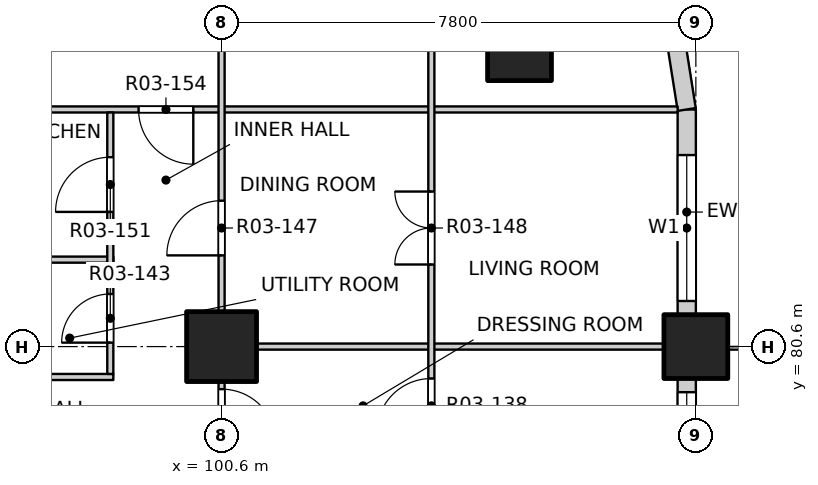
"""IFC4 building model, lengths in metres.
Left out: names, types, materials, properties, quantities, classifications, styles, units other than length and angle.
Written with IfcOpenShell. Run it as: python <this file> out.ifc"""

import sys

from ifc_helpers import new_model, si_unit, direction, frame, frame_2d, origin, origin_2d, place, context, subcontext, project, spatial, rectangle, extrude, element, fill, save


model = new_model("IFC4")
c1 = context("Model", 3, precision=1e-05, world=origin(), true_north=direction((0.0, 1.0)))
c2 = subcontext(c1, "Body", "Model", "MODEL_VIEW")
j1 = project(units=[si_unit("LENGTHUNIT", "METRE"), si_unit("PLANEANGLEUNIT", "RADIAN")], contexts=[c1])
p1 = place(None, origin())
s1 = spatial("IfcSite", under=j1, at=p1, CompositionType="ELEMENT")
p2 = place(p1, origin())
s2 = spatial("IfcBuilding", under=s1, at=p2, CompositionType="ELEMENT")
p3 = place(p2, frame((0.0, 0.0, 43.3)))
s3 = spatial("IfcBuildingStorey", under=s2, at=p3, CompositionType="ELEMENT", Elevation=43.3)
for number, where, z_axis, x_axis in (
    (1, (105.5, 85.5, -0.25), (0.0, 0.0, 1.0), (1.0, 0.0, 0.0)),
    (2, (108.4, 80.6, -0.25), (0.0, 0.0, 1.0), (1.0, 0.0, 0.0)),
):
    element("IfcColumn", number, at=place(p3, frame(where, z_axis=z_axis, x_axis=x_axis)), inside=s3, PredefinedType="COLUMN", context=c2, shape_type="SweptSolid", body=[
        extrude(rectangle(XDim=1.05, YDim=1.05, at=origin_2d()), origin(), (0.0, 0.0, 1.0), 3.35),
    ])
p4 = place(p3, frame((100.6, 80.6, -0.25), z_axis=(0.0, 0.0, 1.0), x_axis=(1.0, 0.0, 0.0)))
e3 = element("IfcColumn", 3, at=p4, inside=s3, PredefinedType="COLUMN", context=c2, shape_type="SweptSolid", body=[
    extrude(rectangle(XDim=1.15, YDim=1.15, at=origin_2d()), origin(), (0.0, 0.0, 1.0), 3.35),
])
p5 = place(p3, frame((108.25, 73.325, 0.0), z_axis=(0.0, 0.0, 1.0), x_axis=(0.0, 1.0, 0.0)))
e4 = element("IfcWall", 4, at=p5, inside=s3, PredefinedType="SOLIDWALL", context=c2, shape_type="SweptSolid", body=[
    extrude(rectangle(XDim=6.75, YDim=0.3, at=frame_2d((3.375, 0.0))), origin(), (0.0, 0.0, 1.0), 3.1),
])
p6 = place(p5, frame((0.525, 0.0, 0.0)))
e5 = element("IfcOpeningElement", 5, at=p6, cuts=e4, PredefinedType="OPENING", context=c2, shape_type="SweptSolid", body=[
    extrude(rectangle(XDim=1.8, YDim=2.4, at=frame_2d((0.9, 1.2))), frame((0.0, 0.16, 0.0), z_axis=(0.0, -1.0, 0.0), x_axis=(1.0, 0.0, 0.0)), (0.0, 0.0, 1.0), 0.32),
])
p7 = place(p5, frame((4.125, 0.0, 0.9)))
e6 = element("IfcOpeningElement", 6, at=p7, cuts=e4, PredefinedType="OPENING", context=c2, shape_type="SweptSolid", body=[
    extrude(rectangle(XDim=2.4, YDim=1.8, at=frame_2d((1.2, 0.9))), frame((0.0, 0.16, 0.0), z_axis=(0.0, -1.0, 0.0), x_axis=(1.0, 0.0, 0.0)), (0.0, 0.0, 1.0), 0.32),
])
p8 = place(p3, frame((108.25, 81.125, 0.0), z_axis=(0.0, 0.0, 1.0), x_axis=(0.0, 1.0, 0.0)))
e7 = element("IfcWall", 7, at=p8, inside=s3, PredefinedType="SOLIDWALL", context=c2, shape_type="SweptSolid", body=[
    extrude(rectangle(XDim=3.375, YDim=0.3, at=frame_2d((1.688, 0.0))), origin(), (0.0, 0.0, 1.0), 3.1),
])
p9 = place(p8, frame((0.225, 0.0, 0.9)))
e8 = element("IfcOpeningElement", 8, at=p9, cuts=e7, PredefinedType="OPENING", context=c2, shape_type="SweptSolid", body=[
    extrude(rectangle(XDim=2.4, YDim=1.8, at=frame_2d((1.2, 0.9))), frame((0.0, 0.16, 0.0), z_axis=(0.0, -1.0, 0.0), x_axis=(1.0, 0.0, 0.0)), (0.0, 0.0, 1.0), 0.32),
])
p10 = place(p3, frame((108.25, 84.5, 0.0), z_axis=(0.0, 0.0, 1.0), x_axis=(-0.156496880861, 0.987678452879, 0.0)))
e9 = element("IfcWall", 9, at=p10, inside=s3, PredefinedType="SOLIDWALL", context=c2, shape_type="SweptSolid", body=[
    extrude(rectangle(XDim=1.173, YDim=0.3, at=frame_2d((0.586, 0.0))), origin(), (0.0, 0.0, 1.0), 3.1),
])
p11 = place(p3, frame((96.6, 80.1, 0.0), z_axis=(0.0, 0.0, 1.0), x_axis=(1.0, 0.0, 0.0)))
e10 = element("IfcWall", 10, at=p11, inside=s3, PredefinedType="PARTITIONING", context=c2, shape_type="SweptSolid", body=[
    extrude(rectangle(XDim=2.22, YDim=0.1, at=frame_2d((1.11, 0.0))), origin(), (0.0, 0.0, 1.0), 3.1),
])
p12 = place(p3, frame((100.55, 80.6, 0.0), z_axis=(0.0, 0.0, 1.0), x_axis=(1.0, 0.0, 0.0)))
e11 = element("IfcWall", 11, at=p12, inside=s3, PredefinedType="PARTITIONING", context=c2, shape_type="SweptSolid", body=[
    extrude(rectangle(XDim=7.55, YDim=0.1, at=frame_2d((3.775, 0.0))), origin(), (0.0, 0.0, 1.0), 3.1),
])
p13 = place(p3, frame((96.6, 82.03, 0.0), z_axis=(0.0, 0.0, 1.0), x_axis=(1.0, 0.0, 0.0)))
e12 = element("IfcWall", 12, at=p13, inside=s3, PredefinedType="PARTITIONING", context=c2, shape_type="SweptSolid", body=[
    extrude(rectangle(XDim=2.22, YDim=0.1, at=frame_2d((1.11, 0.0))), origin(), (0.0, 0.0, 1.0), 3.1),
])
p14 = place(p3, frame((96.6, 84.5, 0.0), z_axis=(0.0, 0.0, 1.0), x_axis=(1.0, 0.0, 0.0)))
e13 = element("IfcWall", 13, at=p14, inside=s3, PredefinedType="PARTITIONING", context=c2, shape_type="SweptSolid", body=[
    extrude(rectangle(XDim=11.5, YDim=0.1, at=frame_2d((5.75, 0.0))), origin(), (0.0, 0.0, 1.0), 3.1),
])
p15 = place(p14, frame((2.635, 0.0, 0.0)))
e14 = element("IfcOpeningElement", 14, at=p15, cuts=e13, PredefinedType="OPENING", context=c2, shape_type="SweptSolid", body=[
    extrude(rectangle(XDim=0.9, YDim=2.1, at=frame_2d((0.45, 1.05))), frame((0.0, 0.06, 0.0), z_axis=(0.0, -1.0, 0.0), x_axis=(1.0, 0.0, 0.0)), (0.0, 0.0, 1.0), 0.12),
])
p16 = place(p3, frame((98.77, 80.15, 0.0), z_axis=(0.0, 0.0, 1.0), x_axis=(0.0, 1.0, 0.0)))
e15 = element("IfcWall", 15, at=p16, inside=s3, PredefinedType="PARTITIONING", context=c2, shape_type="SweptSolid", body=[
    extrude(rectangle(XDim=4.3, YDim=0.1, at=frame_2d((2.15, 0.0))), origin(), (0.0, 0.0, 1.0), 3.1),
])
p17 = place(p16, frame((0.515, 0.0, 0.0)))
e16 = element("IfcOpeningElement", 16, at=p17, cuts=e15, PredefinedType="OPENING", context=c2, shape_type="SweptSolid", body=[
    extrude(rectangle(XDim=0.8, YDim=2.1, at=frame_2d((0.4, 1.05))), frame((0.0, 0.06, 0.0), z_axis=(0.0, -1.0, 0.0), x_axis=(1.0, 0.0, 0.0)), (0.0, 0.0, 1.0), 0.12),
])
p18 = place(p16, frame((2.665, 0.0, 0.0)))
e17 = element("IfcOpeningElement", 17, at=p18, cuts=e15, PredefinedType="OPENING", context=c2, shape_type="SweptSolid", body=[
    extrude(rectangle(XDim=0.9, YDim=2.1, at=frame_2d((0.45, 1.05))), frame((0.0, 0.06, 0.0), z_axis=(0.0, -1.0, 0.0), x_axis=(1.0, 0.0, 0.0)), (0.0, 0.0, 1.0), 0.12),
])
p19 = place(p3, frame((100.6, 41.9, 0.0), z_axis=(0.0, 0.0, 1.0), x_axis=(0.0, 1.0, 0.0)))
e18 = element("IfcWall", 18, at=p19, inside=s3, PredefinedType="PARTITIONING", context=c2, shape_type="SweptSolid", body=[
    extrude(rectangle(XDim=46.2, YDim=0.1, at=frame_2d((23.1, 0.0))), origin(), (0.0, 0.0, 1.0), 3.1),
])
p20 = place(p19, frame((1.2, 0.0, 0.0)))
e19 = element("IfcOpeningElement", 19, at=p20, cuts=e18, PredefinedType="OPENING", context=c2, shape_type="SweptSolid", body=[
    extrude(rectangle(XDim=0.9, YDim=2.1, at=frame_2d((0.45, 1.05))), frame((0.0, 0.06, 0.0), z_axis=(0.0, -1.0, 0.0), x_axis=(1.0, 0.0, 0.0)), (0.0, 0.0, 1.0), 0.12),
])
p21 = place(p19, frame((5.9, 0.0, 0.0)))
e20 = element("IfcOpeningElement", 20, at=p21, cuts=e18, PredefinedType="OPENING", context=c2, shape_type="SweptSolid", body=[
    extrude(rectangle(XDim=0.9, YDim=2.1, at=frame_2d((0.45, 1.05))), frame((0.0, 0.06, 0.0), z_axis=(0.0, -1.0, 0.0), x_axis=(1.0, 0.0, 0.0)), (0.0, 0.0, 1.0), 0.12),
])
p22 = place(p19, frame((9.0, 0.0, 0.0)))
e21 = element("IfcOpeningElement", 21, at=p22, cuts=e18, PredefinedType="OPENING", context=c2, shape_type="SweptSolid", body=[
    extrude(rectangle(XDim=0.9, YDim=2.1, at=frame_2d((0.45, 1.05))), frame((0.0, 0.06, 0.0), z_axis=(0.0, -1.0, 0.0), x_axis=(1.0, 0.0, 0.0)), (0.0, 0.0, 1.0), 0.12),
])
p23 = place(p19, frame((13.725, 0.0, 0.0)))
e22 = element("IfcOpeningElement", 22, at=p23, cuts=e18, PredefinedType="OPENING", context=c2, shape_type="SweptSolid", body=[
    extrude(rectangle(XDim=0.9, YDim=2.1, at=frame_2d((0.45, 1.05))), frame((0.0, 0.06, 0.0), z_axis=(0.0, -1.0, 0.0), x_axis=(1.0, 0.0, 0.0)), (0.0, 0.0, 1.0), 0.12),
])
p24 = place(p19, frame((17.775, 0.0, 0.0)))
e23 = element("IfcOpeningElement", 23, at=p24, cuts=e18, PredefinedType="OPENING", context=c2, shape_type="SweptSolid", body=[
    extrude(rectangle(XDim=0.9, YDim=2.1, at=frame_2d((0.45, 1.05))), frame((0.0, 0.06, 0.0), z_axis=(0.0, -1.0, 0.0), x_axis=(1.0, 0.0, 0.0)), (0.0, 0.0, 1.0), 0.12),
])
p25 = place(p19, frame((21.5, 0.0, 0.0)))
e24 = element("IfcOpeningElement", 24, at=p25, cuts=e18, PredefinedType="OPENING", context=c2, shape_type="SweptSolid", body=[
    extrude(rectangle(XDim=0.9, YDim=2.1, at=frame_2d((0.45, 1.05))), frame((0.0, 0.06, 0.0), z_axis=(0.0, -1.0, 0.0), x_axis=(1.0, 0.0, 0.0)), (0.0, 0.0, 1.0), 0.12),
])
p26 = place(p19, frame((24.6, 0.0, 0.0)))
e25 = element("IfcOpeningElement", 25, at=p26, cuts=e18, PredefinedType="OPENING", context=c2, shape_type="SweptSolid", body=[
    extrude(rectangle(XDim=0.9, YDim=2.1, at=frame_2d((0.45, 1.05))), frame((0.0, 0.06, 0.0), z_axis=(0.0, -1.0, 0.0), x_axis=(1.0, 0.0, 0.0)), (0.0, 0.0, 1.0), 0.12),
])
p27 = place(p19, frame((28.5, 0.0, 0.0)))
e26 = element("IfcOpeningElement", 26, at=p27, cuts=e18, PredefinedType="OPENING", context=c2, shape_type="SweptSolid", body=[
    extrude(rectangle(XDim=0.9, YDim=2.1, at=frame_2d((0.45, 1.05))), frame((0.0, 0.06, 0.0), z_axis=(0.0, -1.0, 0.0), x_axis=(1.0, 0.0, 0.0)), (0.0, 0.0, 1.0), 0.12),
])
p28 = place(p19, frame((33.375, 0.0, 0.0)))
e27 = element("IfcOpeningElement", 27, at=p28, cuts=e18, PredefinedType="OPENING", context=c2, shape_type="SweptSolid", body=[
    extrude(rectangle(XDim=0.9, YDim=2.1, at=frame_2d((0.45, 1.05))), frame((0.0, 0.06, 0.0), z_axis=(0.0, -1.0, 0.0), x_axis=(1.0, 0.0, 0.0)), (0.0, 0.0, 1.0), 0.12),
])
p29 = place(p19, frame((37.1, 0.0, 0.0)))
e28 = element("IfcOpeningElement", 28, at=p29, cuts=e18, PredefinedType="OPENING", context=c2, shape_type="SweptSolid", body=[
    extrude(rectangle(XDim=0.9, YDim=2.1, at=frame_2d((0.45, 1.05))), frame((0.0, 0.06, 0.0), z_axis=(0.0, -1.0, 0.0), x_axis=(1.0, 0.0, 0.0)), (0.0, 0.0, 1.0), 0.12),
])
p30 = place(p19, frame((40.2, 0.0, 0.0)))
e29 = element("IfcOpeningElement", 29, at=p30, cuts=e18, PredefinedType="OPENING", context=c2, shape_type="SweptSolid", body=[
    extrude(rectangle(XDim=0.9, YDim=2.1, at=frame_2d((0.45, 1.05))), frame((0.0, 0.06, 0.0), z_axis=(0.0, -1.0, 0.0), x_axis=(1.0, 0.0, 0.0)), (0.0, 0.0, 1.0), 0.12),
])
p31 = place(p19, frame((44.1, 0.0, 0.0)))
e30 = element("IfcOpeningElement", 30, at=p31, cuts=e18, PredefinedType="OPENING", context=c2, shape_type="SweptSolid", body=[
    extrude(rectangle(XDim=0.9, YDim=2.1, at=frame_2d((0.45, 1.05))), frame((0.0, 0.06, 0.0), z_axis=(0.0, -1.0, 0.0), x_axis=(1.0, 0.0, 0.0)), (0.0, 0.0, 1.0), 0.12),
])
p32 = place(p3, frame((104.05, 41.9, 0.0), z_axis=(0.0, 0.0, 1.0), x_axis=(0.0, 1.0, 0.0)))
e31 = element("IfcWall", 31, at=p32, inside=s3, PredefinedType="PARTITIONING", context=c2, shape_type="SweptSolid", body=[
    extrude(rectangle(XDim=46.2, YDim=0.1, at=frame_2d((23.1, 0.0))), origin(), (0.0, 0.0, 1.0), 3.1),
])
p33 = place(p32, frame((1.05, 0.0, 0.0)))
e32 = element("IfcOpeningElement", 32, at=p33, cuts=e31, PredefinedType="OPENING", context=c2, shape_type="SweptSolid", body=[
    extrude(rectangle(XDim=1.2, YDim=2.1, at=frame_2d((0.6, 1.05))), frame((0.0, 0.06, 0.0), z_axis=(0.0, -1.0, 0.0), x_axis=(1.0, 0.0, 0.0)), (0.0, 0.0, 1.0), 0.12),
])
p34 = place(p32, frame((4.125, 0.0, 0.0)))
e33 = element("IfcOpeningElement", 33, at=p34, cuts=e31, PredefinedType="OPENING", context=c2, shape_type="SweptSolid", body=[
    extrude(rectangle(XDim=0.9, YDim=2.1, at=frame_2d((0.45, 1.05))), frame((0.0, 0.06, 0.0), z_axis=(0.0, -1.0, 0.0), x_axis=(1.0, 0.0, 0.0)), (0.0, 0.0, 1.0), 0.12),
])
p35 = place(p32, frame((6.075, 0.0, 0.0)))
e34 = element("IfcOpeningElement", 34, at=p35, cuts=e31, PredefinedType="OPENING", context=c2, shape_type="SweptSolid", body=[
    extrude(rectangle(XDim=0.9, YDim=2.1, at=frame_2d((0.45, 1.05))), frame((0.0, 0.06, 0.0), z_axis=(0.0, -1.0, 0.0), x_axis=(1.0, 0.0, 0.0)), (0.0, 0.0, 1.0), 0.12),
])
p36 = place(p32, frame((8.85, 0.0, 0.0)))
e35 = element("IfcOpeningElement", 35, at=p36, cuts=e31, PredefinedType="OPENING", context=c2, shape_type="SweptSolid", body=[
    extrude(rectangle(XDim=1.2, YDim=2.1, at=frame_2d((0.6, 1.05))), frame((0.0, 0.06, 0.0), z_axis=(0.0, -1.0, 0.0), x_axis=(1.0, 0.0, 0.0)), (0.0, 0.0, 1.0), 0.12),
])
p37 = place(p32, frame((11.925, 0.0, 0.0)))
e36 = element("IfcOpeningElement", 36, at=p37, cuts=e31, PredefinedType="OPENING", context=c2, shape_type="SweptSolid", body=[
    extrude(rectangle(XDim=0.9, YDim=2.1, at=frame_2d((0.45, 1.05))), frame((0.0, 0.06, 0.0), z_axis=(0.0, -1.0, 0.0), x_axis=(1.0, 0.0, 0.0)), (0.0, 0.0, 1.0), 0.12),
])
p38 = place(p32, frame((13.875, 0.0, 0.0)))
e37 = element("IfcOpeningElement", 37, at=p38, cuts=e31, PredefinedType="OPENING", context=c2, shape_type="SweptSolid", body=[
    extrude(rectangle(XDim=0.9, YDim=2.1, at=frame_2d((0.45, 1.05))), frame((0.0, 0.06, 0.0), z_axis=(0.0, -1.0, 0.0), x_axis=(1.0, 0.0, 0.0)), (0.0, 0.0, 1.0), 0.12),
])
p39 = place(p32, frame((15.825, 0.0, 0.0)))
e38 = element("IfcOpeningElement", 38, at=p39, cuts=e31, PredefinedType="OPENING", context=c2, shape_type="SweptSolid", body=[
    extrude(rectangle(XDim=0.9, YDim=2.1, at=frame_2d((0.45, 1.05))), frame((0.0, 0.06, 0.0), z_axis=(0.0, -1.0, 0.0), x_axis=(1.0, 0.0, 0.0)), (0.0, 0.0, 1.0), 0.12),
])
p40 = place(p32, frame((17.775, 0.0, 0.0)))
e39 = element("IfcOpeningElement", 39, at=p40, cuts=e31, PredefinedType="OPENING", context=c2, shape_type="SweptSolid", body=[
    extrude(rectangle(XDim=0.9, YDim=2.1, at=frame_2d((0.45, 1.05))), frame((0.0, 0.06, 0.0), z_axis=(0.0, -1.0, 0.0), x_axis=(1.0, 0.0, 0.0)), (0.0, 0.0, 1.0), 0.12),
])
p41 = place(p32, frame((19.725, 0.0, 0.0)))
e40 = element("IfcOpeningElement", 40, at=p41, cuts=e31, PredefinedType="OPENING", context=c2, shape_type="SweptSolid", body=[
    extrude(rectangle(XDim=0.9, YDim=2.1, at=frame_2d((0.45, 1.05))), frame((0.0, 0.06, 0.0), z_axis=(0.0, -1.0, 0.0), x_axis=(1.0, 0.0, 0.0)), (0.0, 0.0, 1.0), 0.12),
])
p42 = place(p32, frame((21.675, 0.0, 0.0)))
e41 = element("IfcOpeningElement", 41, at=p42, cuts=e31, PredefinedType="OPENING", context=c2, shape_type="SweptSolid", body=[
    extrude(rectangle(XDim=0.9, YDim=2.1, at=frame_2d((0.45, 1.05))), frame((0.0, 0.06, 0.0), z_axis=(0.0, -1.0, 0.0), x_axis=(1.0, 0.0, 0.0)), (0.0, 0.0, 1.0), 0.12),
])
p43 = place(p32, frame((24.45, 0.0, 0.0)))
e42 = element("IfcOpeningElement", 42, at=p43, cuts=e31, PredefinedType="OPENING", context=c2, shape_type="SweptSolid", body=[
    extrude(rectangle(XDim=1.2, YDim=2.1, at=frame_2d((0.6, 1.05))), frame((0.0, 0.06, 0.0), z_axis=(0.0, -1.0, 0.0), x_axis=(1.0, 0.0, 0.0)), (0.0, 0.0, 1.0), 0.12),
])
p44 = place(p32, frame((28.35, 0.0, 0.0)))
e43 = element("IfcOpeningElement", 43, at=p44, cuts=e31, PredefinedType="OPENING", context=c2, shape_type="SweptSolid", body=[
    extrude(rectangle(XDim=1.2, YDim=2.1, at=frame_2d((0.6, 1.05))), frame((0.0, 0.06, 0.0), z_axis=(0.0, -1.0, 0.0), x_axis=(1.0, 0.0, 0.0)), (0.0, 0.0, 1.0), 0.12),
])
p45 = place(p32, frame((31.425, 0.0, 0.0)))
e44 = element("IfcOpeningElement", 44, at=p45, cuts=e31, PredefinedType="OPENING", context=c2, shape_type="SweptSolid", body=[
    extrude(rectangle(XDim=0.9, YDim=2.1, at=frame_2d((0.45, 1.05))), frame((0.0, 0.06, 0.0), z_axis=(0.0, -1.0, 0.0), x_axis=(1.0, 0.0, 0.0)), (0.0, 0.0, 1.0), 0.12),
])
p46 = place(p32, frame((33.375, 0.0, 0.0)))
e45 = element("IfcOpeningElement", 45, at=p46, cuts=e31, PredefinedType="OPENING", context=c2, shape_type="SweptSolid", body=[
    extrude(rectangle(XDim=0.9, YDim=2.1, at=frame_2d((0.45, 1.05))), frame((0.0, 0.06, 0.0), z_axis=(0.0, -1.0, 0.0), x_axis=(1.0, 0.0, 0.0)), (0.0, 0.0, 1.0), 0.12),
])
p47 = place(p32, frame((35.325, 0.0, 0.0)))
e46 = element("IfcOpeningElement", 46, at=p47, cuts=e31, PredefinedType="OPENING", context=c2, shape_type="SweptSolid", body=[
    extrude(rectangle(XDim=0.9, YDim=2.1, at=frame_2d((0.45, 1.05))), frame((0.0, 0.06, 0.0), z_axis=(0.0, -1.0, 0.0), x_axis=(1.0, 0.0, 0.0)), (0.0, 0.0, 1.0), 0.12),
])
p48 = place(p32, frame((37.275, 0.0, 0.0)))
e47 = element("IfcOpeningElement", 47, at=p48, cuts=e31, PredefinedType="OPENING", context=c2, shape_type="SweptSolid", body=[
    extrude(rectangle(XDim=0.9, YDim=2.1, at=frame_2d((0.45, 1.05))), frame((0.0, 0.06, 0.0), z_axis=(0.0, -1.0, 0.0), x_axis=(1.0, 0.0, 0.0)), (0.0, 0.0, 1.0), 0.12),
])
p49 = place(p32, frame((40.05, 0.0, 0.0)))
e48 = element("IfcOpeningElement", 48, at=p49, cuts=e31, PredefinedType="OPENING", context=c2, shape_type="SweptSolid", body=[
    extrude(rectangle(XDim=1.2, YDim=2.1, at=frame_2d((0.6, 1.05))), frame((0.0, 0.06, 0.0), z_axis=(0.0, -1.0, 0.0), x_axis=(1.0, 0.0, 0.0)), (0.0, 0.0, 1.0), 0.12),
])
p50 = place(p32, frame((43.95, 0.0, 0.0)))
e49 = element("IfcOpeningElement", 49, at=p50, cuts=e31, PredefinedType="OPENING", context=c2, shape_type="SweptSolid", body=[
    extrude(rectangle(XDim=1.2, YDim=2.1, at=frame_2d((0.6, 1.05))), frame((0.0, 0.06, 0.0), z_axis=(0.0, -1.0, 0.0), x_axis=(1.0, 0.0, 0.0)), (0.0, 0.0, 1.0), 0.12),
])
p51 = place(p7, origin())
e50 = element("IfcWindow", 50, at=p51, inside=s3, PartitioningType="DOUBLE_PANEL_VERTICAL", PredefinedType="WINDOW", context=c2, shape_type="SweptSolid", body=[
    extrude(rectangle(XDim=2.4, YDim=1.8, at=frame_2d((1.2, 0.9))), frame((0.0, 0.03, 0.0), z_axis=(0.0, -1.0, 0.0), x_axis=(1.0, 0.0, 0.0)), (0.0, 0.0, 1.0), 0.06),
])
fill(e6, e50)
p52 = place(p9, origin())
e51 = element("IfcWindow", 51, at=p52, inside=s3, PartitioningType="DOUBLE_PANEL_VERTICAL", PredefinedType="WINDOW", context=c2, shape_type="SweptSolid", body=[
    extrude(rectangle(XDim=2.4, YDim=1.8, at=frame_2d((1.2, 0.9))), frame((0.0, 0.03, 0.0), z_axis=(0.0, -1.0, 0.0), x_axis=(1.0, 0.0, 0.0)), (0.0, 0.0, 1.0), 0.06),
])
fill(e8, e51)
p53 = place(p29, origin())
e52 = element("IfcDoor", 52, at=p53, inside=s3, OperationType="SINGLE_SWING_RIGHT", PredefinedType="DOOR", context=c2, shape_type="SweptSolid", body=[
    extrude(rectangle(XDim=0.9, YDim=2.1, at=frame_2d((0.45, 1.05))), frame((0.0, 0.025, 0.0), z_axis=(0.0, -1.0, 0.0), x_axis=(1.0, 0.0, 0.0)), (0.0, 0.0, 1.0), 0.05),
])
fill(e28, e52)
p54 = place(p48, origin())
e53 = element("IfcDoor", 53, at=p54, inside=s3, OperationType="SINGLE_SWING_LEFT", PredefinedType="DOOR", context=c2, shape_type="SweptSolid", body=[
    extrude(rectangle(XDim=0.9, YDim=2.1, at=frame_2d((0.45, 1.05))), frame((0.0, 0.025, 0.0), z_axis=(0.0, -1.0, 0.0), x_axis=(1.0, 0.0, 0.0)), (0.0, 0.0, 1.0), 0.05),
])
fill(e47, e53)
p55 = place(p17, origin())
e54 = element("IfcDoor", 54, at=p55, inside=s3, OperationType="SINGLE_SWING_LEFT", PredefinedType="DOOR", context=c2, shape_type="SweptSolid", body=[
    extrude(rectangle(XDim=0.8, YDim=2.1, at=frame_2d((0.4, 1.05))), frame((0.0, 0.025, 0.0), z_axis=(0.0, -1.0, 0.0), x_axis=(1.0, 0.0, 0.0)), (0.0, 0.0, 1.0), 0.05),
])
fill(e16, e54)
p56 = place(p30, origin())
e55 = element("IfcDoor", 55, at=p56, inside=s3, OperationType="SINGLE_SWING_LEFT", PredefinedType="DOOR", context=c2, shape_type="SweptSolid", body=[
    extrude(rectangle(XDim=0.9, YDim=2.1, at=frame_2d((0.45, 1.05))), frame((0.0, 0.025, 0.0), z_axis=(0.0, -1.0, 0.0), x_axis=(1.0, 0.0, 0.0)), (0.0, 0.0, 1.0), 0.05),
])
fill(e29, e55)
p57 = place(p49, origin())
e56 = element("IfcDoor", 56, at=p57, inside=s3, OperationType="DOUBLE_DOOR_SINGLE_SWING", PredefinedType="DOOR", context=c2, shape_type="SweptSolid", body=[
    extrude(rectangle(XDim=1.2, YDim=2.1, at=frame_2d((0.6, 1.05))), frame((0.0, 0.025, 0.0), z_axis=(0.0, -1.0, 0.0), x_axis=(1.0, 0.0, 0.0)), (0.0, 0.0, 1.0), 0.05),
])
fill(e48, e56)
p58 = place(p18, origin())
e57 = element("IfcDoor", 57, at=p58, inside=s3, OperationType="SINGLE_SWING_LEFT", PredefinedType="DOOR", context=c2, shape_type="SweptSolid", body=[
    extrude(rectangle(XDim=0.9, YDim=2.1, at=frame_2d((0.45, 1.05))), frame((0.0, 0.025, 0.0), z_axis=(0.0, -1.0, 0.0), x_axis=(1.0, 0.0, 0.0)), (0.0, 0.0, 1.0), 0.05),
])
fill(e17, e57)
p59 = place(p15, origin())
e58 = element("IfcDoor", 58, at=p59, inside=s3, OperationType="SINGLE_SWING_LEFT", PredefinedType="DOOR", context=c2, shape_type="SweptSolid", body=[
    extrude(rectangle(XDim=0.9, YDim=2.1, at=frame_2d((0.45, 1.05))), frame((0.0, 0.025, 0.0), z_axis=(0.0, -1.0, 0.0), x_axis=(1.0, 0.0, 0.0)), (0.0, 0.0, 1.0), 0.05),
])
fill(e14, e58)
save(model, sys.argv[1])
